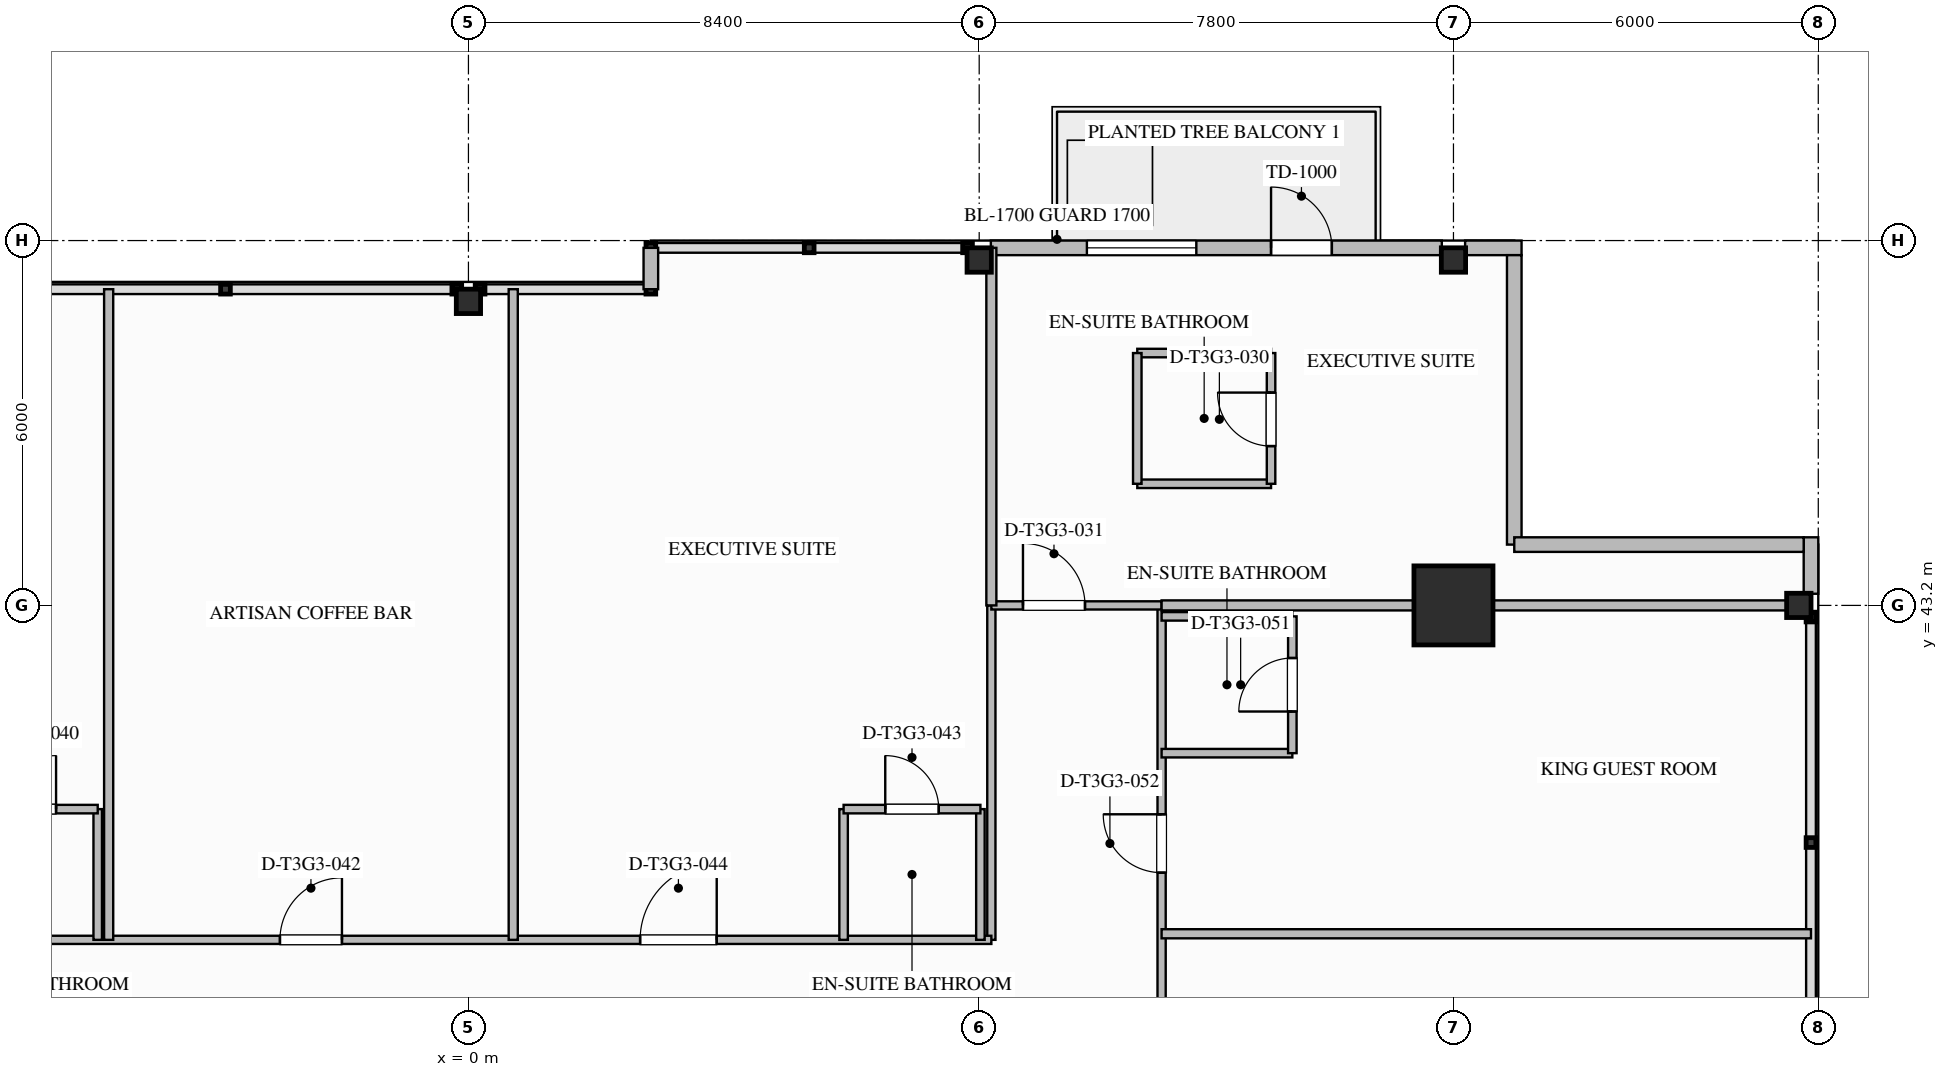
"""IFC4 building model, lengths in metres.
Left out: names, types, materials, properties, quantities, classifications, styles, units other than length and angle.
Written with IfcOpenShell. Run it as: python <this file> out.ifc"""

import sys

from ifc_helpers import new_model, si_unit, direction, frame, frame_2d, origin, origin_2d, place, context, subcontext, project, spatial, rectangle, i_section, extrude, element, fill, save


model = new_model("IFC4")
c1 = context("Model", 3, precision=1e-05, world=origin(), true_north=direction((0.0, 1.0)))
c2 = subcontext(c1, "Body", "Model", "MODEL_VIEW")
j1 = project(units=[si_unit("LENGTHUNIT", "METRE"), si_unit("PLANEANGLEUNIT", "RADIAN")], contexts=[c1])
p1 = place(None, origin())
s1 = spatial("IfcSite", under=j1, at=p1, CompositionType="ELEMENT")
p2 = place(p1, origin())
s2 = spatial("IfcBuilding", under=s1, at=p2, CompositionType="ELEMENT")
p3 = place(p2, frame((0.0, 0.0, 178.8)))
s3 = spatial("IfcBuildingStorey", under=s2, at=p3, CompositionType="ELEMENT", Elevation=178.8)
p4 = place(p3, frame((16.2, 43.2, 0.0), z_axis=(0.0, 0.0, 1.0), x_axis=(1.0, 0.0, 0.0)))
e1 = element("IfcColumn", 1, at=p4, inside=s3, PredefinedType="COLUMN", context=c2, shape_type="SweptSolid", body=[
    extrude(rectangle(XDim=1.3, YDim=1.3, at=origin_2d()), origin(), (0.0, 0.0, 1.0), 3.55),
])
for number, where, z_axis, x_axis in (
    (2, (21.88, 43.2, 0.0), (0.0, 0.0, 1.0), (1.0, 0.0, 0.0)),
    (3, (0.0, 48.2, 0.0), (0.0, 0.0, 1.0), (0.0, 1.0, 0.0)),
    (4, (8.4, 48.88, 0.0), (0.0, 0.0, 1.0), (0.0, 1.0, 0.0)),
    (5, (16.2, 48.88, 0.0), (0.0, 0.0, 1.0), (0.0, 1.0, 0.0)),
):
    element("IfcColumn", number, at=place(p3, frame(where, z_axis=z_axis, x_axis=x_axis)), inside=s3, PredefinedType="COLUMN", context=c2, shape_type="SweptSolid", body=[
        extrude(i_section(OverallWidth=0.401, OverallDepth=0.399, WebThickness=0.025, FlangeThickness=0.04, FilletRadius=0.025, at=origin_2d()), origin(), (0.0, 0.0, 1.0), 3.547),
    ])
p5 = place(p3, frame((22.08, 44.32, 0.0), z_axis=(0.0, 0.0, 1.0), x_axis=(0.0, -1.0, 0.0)))
e6 = element("IfcWall", 6, at=p5, inside=s3, PredefinedType="STANDARD", context=c2, shape_type="SweptSolid", body=[
    extrude(rectangle(XDim=0.928, YDim=0.24, at=frame_2d((0.464, 0.0))), origin(), (0.0, 0.0, 1.0), 3.29),
])
p6 = place(p3, frame((8.592, 49.08, 0.0), z_axis=(0.0, 0.0, 1.0), x_axis=(1.0, 0.0, 0.0)))
e7 = element("IfcWall", 7, at=p6, inside=s3, PredefinedType="STANDARD", context=c2, shape_type="SweptSolid", body=[
    extrude(rectangle(XDim=7.417, YDim=0.24, at=frame_2d((3.708, 0.0))), origin(), (0.0, 0.0, 1.0), 2.753),
])
p7 = place(p6, frame((4.608, 0.0, 0.0)))
e8 = element("IfcOpeningElement", 8, at=p7, cuts=e7, PredefinedType="OPENING", context=c2, shape_type="SweptSolid", body=[
    extrude(rectangle(XDim=1.0, YDim=2.2, at=frame_2d((0.5, 1.1))), frame((0.0, 0.13, 0.0), z_axis=(0.0, -1.0, 0.0), x_axis=(1.0, 0.0, 0.0)), (0.0, 0.0, 1.0), 0.26),
])
p8 = place(p6, frame((1.58, 0.0, 0.75)))
e9 = element("IfcOpeningElement", 9, at=p8, cuts=e7, PredefinedType="OPENING", context=c2, shape_type="SweptSolid", body=[
    extrude(rectangle(XDim=1.8, YDim=1.903, at=frame_2d((0.9, 0.952))), frame((0.0, 0.13, 0.0), z_axis=(0.0, -1.0, 0.0), x_axis=(1.0, 0.0, 0.0)), (0.0, 0.0, 1.0), 0.26),
])
p9 = place(p3, frame((16.392, 49.08, 0.0), z_axis=(0.0, 0.0, 1.0), x_axis=(1.0, 0.0, 0.0)))
e10 = element("IfcWall", 10, at=p9, inside=s3, PredefinedType="STANDARD", context=c2, shape_type="SweptSolid", body=[
    extrude(rectangle(XDim=0.928, YDim=0.24, at=frame_2d((0.464, 0.0))), origin(), (0.0, 0.0, 1.0), 3.29),
])
for number, where, z_axis, x_axis in (
    (11, (17.2, 48.96, 0.0), (0.0, 0.0, 1.0), (0.0, -1.0, 0.0)),
    (12, (17.2, 44.2, 0.0), (0.0, 0.0, 1.0), (1.0, 0.0, 0.0)),
):
    element("IfcWall", number, at=place(p3, frame(where, z_axis=z_axis, x_axis=x_axis)), inside=s3, PredefinedType="STANDARD", context=c2, shape_type="SweptSolid", body=[
        extrude(rectangle(XDim=4.76, YDim=0.24, at=frame_2d((2.38, 0.0))), origin(), (0.0, 0.0, 1.0), 3.29),
    ])
p10 = place(p3, frame((3.0, 48.4, 0.0), z_axis=(0.0, 0.0, 1.0), x_axis=(0.0, 1.0, 0.0)))
e13 = element("IfcWall", 13, at=p10, inside=s3, PredefinedType="STANDARD", context=c2, shape_type="SweptSolid", body=[
    extrude(rectangle(XDim=0.68, YDim=0.24, at=frame_2d((0.34, 0.0))), origin(), (0.0, 0.0, 1.0), 3.29),
])
p11 = place(p3, frame((8.6, 37.7, 0.0), z_axis=(0.0, 0.0, 1.0), x_axis=(0.0, 1.0, 0.0)))
e14 = element("IfcWall", 14, at=p11, inside=s3, PredefinedType="PARTITIONING", context=c2, shape_type="SweptSolid", body=[
    extrude(rectangle(XDim=5.5, YDim=0.135, at=frame_2d((2.75, 0.0))), origin(), (0.0, 0.0, 1.0), 2.667),
])
p12 = place(p3, frame((-16.2, 37.7, 0.0), z_axis=(0.0, 0.0, 1.0), x_axis=(1.0, 0.0, 0.0)))
e15 = element("IfcWall", 15, at=p12, inside=s3, PredefinedType="PARTITIONING", context=c2, shape_type="SweptSolid", body=[
    extrude(rectangle(XDim=24.8, YDim=0.135, at=frame_2d((12.4, 0.0))), origin(), (0.0, 0.0, 1.0), 3.29),
])
p13 = place(p12, frame((3.296, 0.0, 0.0)))
e16 = element("IfcOpeningElement", 16, at=p13, cuts=e15, PredefinedType="OPENING", context=c2, shape_type="SweptSolid", body=[
    extrude(rectangle(XDim=1.26, YDim=2.2, at=frame_2d((0.63, 1.1))), frame((0.0, 0.077, 0.0), z_axis=(0.0, -1.0, 0.0), x_axis=(1.0, 0.0, 0.0)), (0.0, 0.0, 1.0), 0.155),
])
p14 = place(p12, frame((13.1, 0.0, 0.0)))
e17 = element("IfcOpeningElement", 17, at=p14, cuts=e15, PredefinedType="OPENING", context=c2, shape_type="SweptSolid", body=[
    extrude(rectangle(XDim=1.02, YDim=2.15, at=frame_2d((0.51, 1.075))), frame((0.0, 0.077, 0.0), z_axis=(0.0, -1.0, 0.0), x_axis=(1.0, 0.0, 0.0)), (0.0, 0.0, 1.0), 0.155),
])
p15 = place(p12, frame((19.023, 0.0, 0.0)))
e18 = element("IfcOpeningElement", 18, at=p15, cuts=e15, PredefinedType="OPENING", context=c2, shape_type="SweptSolid", body=[
    extrude(rectangle(XDim=1.26, YDim=2.2, at=frame_2d((0.63, 1.1))), frame((0.0, 0.077, 0.0), z_axis=(0.0, -1.0, 0.0), x_axis=(1.0, 0.0, 0.0)), (0.0, 0.0, 1.0), 0.155),
])
p16 = place(p3, frame((11.4, 10.8, 0.0), z_axis=(0.0, 0.0, 1.0), x_axis=(0.0, 1.0, 0.0)))
e19 = element("IfcWall", 19, at=p16, inside=s3, PredefinedType="PARTITIONING", context=c2, shape_type="SweptSolid", body=[
    extrude(rectangle(XDim=32.4, YDim=0.135, at=frame_2d((16.2, 0.0))), origin(), (0.0, 0.0, 1.0), 3.29),
])
p17 = place(p16, frame((1.005, 0.0, 0.0)))
e20 = element("IfcOpeningElement", 20, at=p17, cuts=e19, PredefinedType="OPENING", context=c2, shape_type="SweptSolid", body=[
    extrude(rectangle(XDim=0.96, YDim=2.15, at=frame_2d((0.48, 1.075))), frame((0.0, 0.077, 0.0), z_axis=(0.0, -1.0, 0.0), x_axis=(1.0, 0.0, 0.0)), (0.0, 0.0, 1.0), 0.155),
])
p18 = place(p16, frame((8.94, 0.0, 0.0)))
e21 = element("IfcOpeningElement", 21, at=p18, cuts=e19, PredefinedType="OPENING", context=c2, shape_type="SweptSolid", body=[
    extrude(rectangle(XDim=1.02, YDim=2.15, at=frame_2d((0.51, 1.075))), frame((0.0, 0.077, 0.0), z_axis=(0.0, -1.0, 0.0), x_axis=(1.0, 0.0, 0.0)), (0.0, 0.0, 1.0), 0.155),
])
p19 = place(p16, frame((14.445, 0.0, 0.0)))
e22 = element("IfcOpeningElement", 22, at=p19, cuts=e19, PredefinedType="OPENING", context=c2, shape_type="SweptSolid", body=[
    extrude(rectangle(XDim=0.96, YDim=2.15, at=frame_2d((0.48, 1.075))), frame((0.0, 0.077, 0.0), z_axis=(0.0, -1.0, 0.0), x_axis=(1.0, 0.0, 0.0)), (0.0, 0.0, 1.0), 0.155),
])
p20 = place(p16, frame((22.38, 0.0, 0.0)))
e23 = element("IfcOpeningElement", 23, at=p20, cuts=e19, PredefinedType="OPENING", context=c2, shape_type="SweptSolid", body=[
    extrude(rectangle(XDim=1.02, YDim=2.15, at=frame_2d((0.51, 1.075))), frame((0.0, 0.077, 0.0), z_axis=(0.0, -1.0, 0.0), x_axis=(1.0, 0.0, 0.0)), (0.0, 0.0, 1.0), 0.155),
])
p21 = place(p16, frame((28.005, 0.0, 0.0)))
e24 = element("IfcOpeningElement", 24, at=p21, cuts=e19, PredefinedType="OPENING", context=c2, shape_type="SweptSolid", body=[
    extrude(rectangle(XDim=0.96, YDim=2.15, at=frame_2d((0.48, 1.075))), frame((0.0, 0.077, 0.0), z_axis=(0.0, -1.0, 0.0), x_axis=(1.0, 0.0, 0.0)), (0.0, 0.0, 1.0), 0.155),
])
p22 = place(p3, frame((8.6, 43.2, 0.0), z_axis=(0.0, 0.0, 1.0), x_axis=(1.0, 0.0, 0.0)))
e25 = element("IfcWall", 25, at=p22, inside=s3, PredefinedType="PARTITIONING", context=c2, shape_type="SweptSolid", body=[
    extrude(rectangle(XDim=2.8, YDim=0.135, at=frame_2d((1.4, 0.0))), origin(), (0.0, 0.0, 1.0), 2.58),
])
p23 = place(p22, frame((0.52, 0.0, 0.0)))
e26 = element("IfcOpeningElement", 26, at=p23, cuts=e25, PredefinedType="OPENING", context=c2, shape_type="SweptSolid", body=[
    extrude(rectangle(XDim=1.02, YDim=2.15, at=frame_2d((0.51, 1.075))), frame((0.0, 0.077, 0.0), z_axis=(0.0, -1.0, 0.0), x_axis=(1.0, 0.0, 0.0)), (0.0, 0.0, 1.0), 0.155),
])
p24 = place(p3, frame((8.6, 43.2, 0.0), z_axis=(0.0, 0.0, 1.0), x_axis=(0.0, 1.0, 0.0)))
e27 = element("IfcWall", 27, at=p24, inside=s3, PredefinedType="PARTITIONING", context=c2, shape_type="SweptSolid", body=[
    extrude(rectangle(XDim=5.88, YDim=0.165, at=frame_2d((2.94, 0.0))), origin(), (0.0, 0.0, 1.0), 2.58),
])
p25 = place(p3, frame((11.4, 43.2, 0.0), z_axis=(0.0, 0.0, 1.0), x_axis=(1.0, 0.0, 0.0)))
e28 = element("IfcWall", 28, at=p25, inside=s3, PredefinedType="PARTITIONING", context=c2, shape_type="SweptSolid", body=[
    extrude(rectangle(XDim=10.68, YDim=0.165, at=frame_2d((5.34, 0.0))), origin(), (0.0, 0.0, 1.0), 2.58),
])
for number, where, z_axis, x_axis in (
    (29, (11.0, 45.2, 0.0), (0.0, 0.0, 1.0), (1.0, 0.0, 0.0)),
    (30, (11.0, 47.35, 0.0), (0.0, 0.0, 1.0), (1.0, 0.0, 0.0)),
):
    element("IfcWall", number, at=place(p3, frame(where, z_axis=z_axis, x_axis=x_axis)), inside=s3, PredefinedType="PLUMBINGWALL", context=c2, shape_type="SweptSolid", body=[
        extrude(rectangle(XDim=2.2, YDim=0.14, at=frame_2d((1.1, 0.0))), origin(), (0.0, 0.0, 1.0), 3.29),
    ])
p26 = place(p3, frame((11.0, 45.2, 0.0), z_axis=(0.0, 0.0, 1.0), x_axis=(0.0, 1.0, 0.0)))
e31 = element("IfcWall", 31, at=p26, inside=s3, PredefinedType="PLUMBINGWALL", context=c2, shape_type="SweptSolid", body=[
    extrude(rectangle(XDim=2.15, YDim=0.14, at=frame_2d((1.075, 0.0))), origin(), (0.0, 0.0, 1.0), 3.29),
])
p27 = place(p3, frame((13.2, 45.2, 0.0), z_axis=(0.0, 0.0, 1.0), x_axis=(0.0, 1.0, 0.0)))
e32 = element("IfcWall", 32, at=p27, inside=s3, PredefinedType="PLUMBINGWALL", context=c2, shape_type="SweptSolid", body=[
    extrude(rectangle(XDim=2.15, YDim=0.14, at=frame_2d((1.075, 0.0))), origin(), (0.0, 0.0, 1.0), 3.29),
])
p28 = place(p27, frame((0.62, 0.0, 0.0)))
e33 = element("IfcOpeningElement", 33, at=p28, cuts=e32, PredefinedType="OPENING", context=c2, shape_type="SweptSolid", body=[
    extrude(rectangle(XDim=0.88, YDim=2.1, at=frame_2d((0.44, 1.05))), frame((0.0, 0.08, 0.0), z_axis=(0.0, -1.0, 0.0), x_axis=(1.0, 0.0, 0.0)), (0.0, 0.0, 1.0), 0.16),
])
p29 = place(p3, frame((-6.097, 37.7, 0.0), z_axis=(0.0, 0.0, 1.0), x_axis=(0.0, 1.0, 0.0)))
e34 = element("IfcWall", 34, at=p29, inside=s3, PredefinedType="PLUMBINGWALL", context=c2, shape_type="SweptSolid", body=[
    extrude(rectangle(XDim=2.15, YDim=0.14, at=frame_2d((1.075, 0.0))), origin(), (0.0, 0.0, 1.0), 3.29),
])
p30 = place(p3, frame((-8.347, 39.85, 0.0), z_axis=(0.0, 0.0, 1.0), x_axis=(1.0, 0.0, 0.0)))
e35 = element("IfcWall", 35, at=p30, inside=s3, PredefinedType="PLUMBINGWALL", context=c2, shape_type="SweptSolid", body=[
    extrude(rectangle(XDim=2.25, YDim=0.14, at=frame_2d((1.125, 0.0))), origin(), (0.0, 0.0, 1.0), 3.29),
])
p31 = place(p30, frame((0.685, 0.0, 0.0)))
e36 = element("IfcOpeningElement", 36, at=p31, cuts=e35, PredefinedType="OPENING", context=c2, shape_type="SweptSolid", body=[
    extrude(rectangle(XDim=0.88, YDim=2.1, at=frame_2d((0.44, 1.05))), frame((0.0, 0.08, 0.0), z_axis=(0.0, -1.0, 0.0), x_axis=(1.0, 0.0, 0.0)), (0.0, 0.0, 1.0), 0.16),
])
for number, where, z_axis, x_axis in (
    (37, (-5.917, 37.7, 0.0), (0.0, 0.0, 1.0), (0.0, 1.0, 0.0)),
    (38, (0.737, 37.7, 0.0), (0.0, 0.0, 1.0), (0.0, 1.0, 0.0)),
):
    element("IfcWall", number, at=place(p3, frame(where, z_axis=z_axis, x_axis=x_axis)), inside=s3, PredefinedType="PARTITIONING", context=c2, shape_type="SweptSolid", body=[
        extrude(rectangle(XDim=10.7, YDim=0.15, at=frame_2d((5.35, 0.0))), origin(), (0.0, 0.0, 1.0), 3.29),
    ])
p32 = place(p3, frame((6.17, 37.7, 0.0), z_axis=(0.0, 0.0, 1.0), x_axis=(0.0, 1.0, 0.0)))
e39 = element("IfcWall", 39, at=p32, inside=s3, PredefinedType="PLUMBINGWALL", context=c2, shape_type="SweptSolid", body=[
    extrude(rectangle(XDim=2.15, YDim=0.14, at=frame_2d((1.075, 0.0))), origin(), (0.0, 0.0, 1.0), 3.29),
])
p33 = place(p3, frame((8.42, 37.7, 0.0), z_axis=(0.0, 0.0, 1.0), x_axis=(0.0, 1.0, 0.0)))
e40 = element("IfcWall", 40, at=p33, inside=s3, PredefinedType="PLUMBINGWALL", context=c2, shape_type="SweptSolid", body=[
    extrude(rectangle(XDim=2.15, YDim=0.14, at=frame_2d((1.075, 0.0))), origin(), (0.0, 0.0, 1.0), 2.667),
])
p34 = place(p3, frame((6.17, 39.85, 0.0), z_axis=(0.0, 0.0, 1.0), x_axis=(1.0, 0.0, 0.0)))
e41 = element("IfcWall", 41, at=p34, inside=s3, PredefinedType="PLUMBINGWALL", context=c2, shape_type="SweptSolid", body=[
    extrude(rectangle(XDim=2.25, YDim=0.14, at=frame_2d((1.125, 0.0))), origin(), (0.0, 0.0, 1.0), 3.29),
])
p35 = place(p34, frame((0.685, 0.0, 0.0)))
e42 = element("IfcOpeningElement", 42, at=p35, cuts=e41, PredefinedType="OPENING", context=c2, shape_type="SweptSolid", body=[
    extrude(rectangle(XDim=0.88, YDim=2.1, at=frame_2d((0.44, 1.05))), frame((0.0, 0.08, 0.0), z_axis=(0.0, -1.0, 0.0), x_axis=(1.0, 0.0, 0.0)), (0.0, 0.0, 1.0), 0.16),
])
p36 = place(p3, frame((11.4, 37.8, 0.0), z_axis=(0.0, 0.0, 1.0), x_axis=(1.0, 0.0, 0.0)))
e43 = element("IfcWall", 43, at=p36, inside=s3, PredefinedType="PARTITIONING", context=c2, shape_type="SweptSolid", body=[
    extrude(rectangle(XDim=10.68, YDim=0.15, at=frame_2d((5.34, 0.0))), origin(), (0.0, 0.0, 1.0), 3.29),
])
p37 = place(p3, frame((11.4, 40.77, 0.0), z_axis=(0.0, 0.0, 1.0), x_axis=(1.0, 0.0, 0.0)))
e44 = element("IfcWall", 44, at=p37, inside=s3, PredefinedType="PLUMBINGWALL", context=c2, shape_type="SweptSolid", body=[
    extrude(rectangle(XDim=2.15, YDim=0.14, at=frame_2d((1.075, 0.0))), origin(), (0.0, 0.0, 1.0), 3.29),
])
p38 = place(p3, frame((11.4, 43.02, 0.0), z_axis=(0.0, 0.0, 1.0), x_axis=(1.0, 0.0, 0.0)))
e45 = element("IfcWall", 45, at=p38, inside=s3, PredefinedType="PLUMBINGWALL", context=c2, shape_type="SweptSolid", body=[
    extrude(rectangle(XDim=2.15, YDim=0.14, at=frame_2d((1.075, 0.0))), origin(), (0.0, 0.0, 1.0), 2.58),
])
p39 = place(p3, frame((13.55, 40.77, 0.0), z_axis=(0.0, 0.0, 1.0), x_axis=(0.0, 1.0, 0.0)))
e46 = element("IfcWall", 46, at=p39, inside=s3, PredefinedType="PLUMBINGWALL", context=c2, shape_type="SweptSolid", body=[
    extrude(rectangle(XDim=2.25, YDim=0.14, at=frame_2d((1.125, 0.0))), origin(), (0.0, 0.0, 1.0), 3.29),
])
p40 = place(p39, frame((0.685, 0.0, 0.0)))
e47 = element("IfcOpeningElement", 47, at=p40, cuts=e46, PredefinedType="OPENING", context=c2, shape_type="SweptSolid", body=[
    extrude(rectangle(XDim=0.88, YDim=2.1, at=frame_2d((0.44, 1.05))), frame((0.0, 0.08, 0.0), z_axis=(0.0, -1.0, 0.0), x_axis=(1.0, 0.0, 0.0)), (0.0, 0.0, 1.0), 0.16),
])
p41 = place(p7, origin())
e48 = element("IfcDoor", 48, at=p41, inside=s3, OperationType="SINGLE_SWING_LEFT", PredefinedType="DOOR", context=c2, shape_type="SweptSolid", body=[
    extrude(rectangle(XDim=1.0, YDim=2.2, at=frame_2d((0.5, 1.1))), frame((0.0, 0.025, 0.0), z_axis=(0.0, -1.0, 0.0), x_axis=(1.0, 0.0, 0.0)), (0.0, 0.0, 1.0), 0.05),
])
fill(e8, e48)
p42 = place(p8, origin())
e49 = element("IfcWindow", 49, at=p42, inside=s3, PartitioningType="SINGLE_PANEL", PredefinedType="WINDOW", context=c2, shape_type="SweptSolid", body=[
    extrude(rectangle(XDim=1.8, YDim=1.903, at=frame_2d((0.9, 0.952))), frame((0.0, 0.03, 0.0), z_axis=(0.0, -1.0, 0.0), x_axis=(1.0, 0.0, 0.0)), (0.0, 0.0, 1.0), 0.06),
])
fill(e9, e49)
p43 = place(p28, origin())
e50 = element("IfcDoor", 50, at=p43, inside=s3, OperationType="SINGLE_SWING_RIGHT", PredefinedType="DOOR", context=c2, shape_type="SweptSolid", body=[
    extrude(rectangle(XDim=0.88, YDim=2.1, at=frame_2d((0.44, 1.05))), frame((0.0, 0.025, 0.0), z_axis=(0.0, -1.0, 0.0), x_axis=(1.0, 0.0, 0.0)), (0.0, 0.0, 1.0), 0.05),
])
fill(e33, e50)
p44 = place(p23, origin())
e51 = element("IfcDoor", 51, at=p44, inside=s3, OperationType="SINGLE_SWING_LEFT", PredefinedType="DOOR", context=c2, shape_type="SweptSolid", body=[
    extrude(rectangle(XDim=1.02, YDim=2.15, at=frame_2d((0.51, 1.075))), frame((0.0, 0.025, 0.0), z_axis=(0.0, -1.0, 0.0), x_axis=(1.0, 0.0, 0.0)), (0.0, 0.0, 1.0), 0.05),
])
fill(e26, e51)
p45 = place(p31, origin())
e52 = element("IfcDoor", 52, at=p45, inside=s3, OperationType="SINGLE_SWING_RIGHT", PredefinedType="DOOR", context=c2, shape_type="SweptSolid", body=[
    extrude(rectangle(XDim=0.88, YDim=2.1, at=frame_2d((0.44, 1.05))), frame((0.0, 0.025, 0.0), z_axis=(0.0, -1.0, 0.0), x_axis=(1.0, 0.0, 0.0)), (0.0, 0.0, 1.0), 0.05),
])
fill(e36, e52)
p46 = place(p14, origin())
e53 = element("IfcDoor", 53, at=p46, inside=s3, OperationType="SINGLE_SWING_RIGHT", PredefinedType="DOOR", context=c2, shape_type="SweptSolid", body=[
    extrude(rectangle(XDim=1.02, YDim=2.15, at=frame_2d((0.51, 1.075))), frame((0.0, 0.025, 0.0), z_axis=(0.0, -1.0, 0.0), x_axis=(1.0, 0.0, 0.0)), (0.0, 0.0, 1.0), 0.05),
])
fill(e17, e53)
p47 = place(p35, origin())
e54 = element("IfcDoor", 54, at=p47, inside=s3, OperationType="SINGLE_SWING_LEFT", PredefinedType="DOOR", context=c2, shape_type="SweptSolid", body=[
    extrude(rectangle(XDim=0.88, YDim=2.1, at=frame_2d((0.44, 1.05))), frame((0.0, 0.025, 0.0), z_axis=(0.0, -1.0, 0.0), x_axis=(1.0, 0.0, 0.0)), (0.0, 0.0, 1.0), 0.05),
])
fill(e42, e54)
p48 = place(p15, origin())
e55 = element("IfcDoor", 55, at=p48, inside=s3, OperationType="SINGLE_SWING_RIGHT", PredefinedType="DOOR", context=c2, shape_type="SweptSolid", body=[
    extrude(rectangle(XDim=1.26, YDim=2.2, at=frame_2d((0.63, 1.1))), frame((0.0, 0.025, 0.0), z_axis=(0.0, -1.0, 0.0), x_axis=(1.0, 0.0, 0.0)), (0.0, 0.0, 1.0), 0.05),
])
fill(e18, e55)
p49 = place(p40, origin())
e56 = element("IfcDoor", 56, at=p49, inside=s3, OperationType="SINGLE_SWING_LEFT", PredefinedType="DOOR", context=c2, shape_type="SweptSolid", body=[
    extrude(rectangle(XDim=0.88, YDim=2.1, at=frame_2d((0.44, 1.05))), frame((0.0, 0.025, 0.0), z_axis=(0.0, -1.0, 0.0), x_axis=(1.0, 0.0, 0.0)), (0.0, 0.0, 1.0), 0.05),
])
fill(e47, e56)
p50 = place(p21, origin())
e57 = element("IfcDoor", 57, at=p50, inside=s3, OperationType="SINGLE_SWING_RIGHT", PredefinedType="DOOR", context=c2, shape_type="SweptSolid", body=[
    extrude(rectangle(XDim=0.96, YDim=2.15, at=frame_2d((0.48, 1.075))), frame((0.0, 0.025, 0.0), z_axis=(0.0, -1.0, 0.0), x_axis=(1.0, 0.0, 0.0)), (0.0, 0.0, 1.0), 0.05),
])
fill(e24, e57)
save(model, sys.argv[1])
